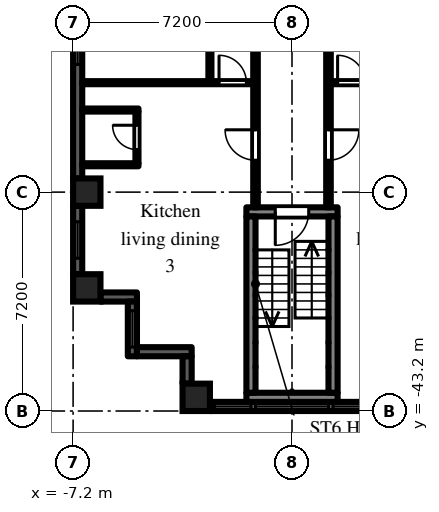
"""IFC4 building model, lengths in metres.
Left out: names, types, materials, properties, quantities, classifications, styles, units other than length and angle.
Written with IfcOpenShell. Run it as: python <this file> out.ifc"""

import sys

from ifc_helpers import new_model, si_unit, direction, frame, frame_2d, origin, origin_2d, place, context, subcontext, project, spatial, rectangle, extrude, element, fill, save


model = new_model("IFC4")
c1 = context("Model", 3, precision=1e-05, world=origin(), true_north=direction((0.0, 1.0)))
c2 = subcontext(c1, "Body", "Model", "MODEL_VIEW")
j1 = project(units=[si_unit("LENGTHUNIT", "METRE"), si_unit("PLANEANGLEUNIT", "RADIAN")], contexts=[c1])
p1 = place(None, origin())
s1 = spatial("IfcSite", under=j1, at=p1, CompositionType="ELEMENT")
p2 = place(p1, origin())
s2 = spatial("IfcBuilding", under=s1, at=p2, CompositionType="ELEMENT")
p3 = place(p2, frame((0.0, 0.0, 59.7)))
s3 = spatial("IfcBuildingStorey", under=s2, at=p3, CompositionType="ELEMENT", Elevation=59.7)
for number, where, z_axis, x_axis in (
    (1, (-6.75, -39.15, 0.0), (0.0, 0.0, 1.0), (1.0, 0.0, 0.0)),
    (2, (-6.75, -36.0, 0.0), (0.0, 0.0, 1.0), (1.0, 0.0, 0.0)),
    (3, (-3.15, -42.75, 0.0), (0.0, 0.0, 1.0), (1.0, 0.0, 0.0)),
):
    element("IfcColumn", number, at=place(p3, frame(where, z_axis=z_axis, x_axis=x_axis)), inside=s3, PredefinedType="COLUMN", context=c2, shape_type="SweptSolid", body=[
        extrude(rectangle(XDim=0.9, YDim=0.9, at=origin_2d()), origin(), (0.0, 0.0, 1.0), 3.0),
    ])
p4 = place(p3, frame((-7.05, -29.25, 0.0), z_axis=(0.0, 0.0, 1.0), x_axis=(0.0, -1.0, 0.0)))
e4 = element("IfcWall", 4, at=p4, inside=s3, PredefinedType="SOLIDWALL", context=c2, shape_type="SweptSolid", body=[
    extrude(rectangle(XDim=6.3, YDim=0.3, at=frame_2d((3.15, 0.0))), origin(), (0.0, 0.0, 1.0), 2.1),
])
p5 = place(p4, frame((0.15, 0.0, 0.2)))
e5 = element("IfcOpeningElement", 5, at=p5, cuts=e4, PredefinedType="OPENING", context=c2, shape_type="SweptSolid", body=[
    extrude(rectangle(XDim=2.4, YDim=1.85, at=frame_2d((1.2, 0.925))), frame((0.0, 0.16, 0.0), z_axis=(0.0, -1.0, 0.0), x_axis=(1.0, 0.0, 0.0)), (0.0, 0.0, 1.0), 0.32),
])
p6 = place(p3, frame((-7.05, -36.45, 0.0), z_axis=(0.0, 0.0, 1.0), x_axis=(0.0, -1.0, 0.0)))
e6 = element("IfcWall", 6, at=p6, inside=s3, PredefinedType="SOLIDWALL", context=c2, shape_type="SweptSolid", body=[
    extrude(rectangle(XDim=2.25, YDim=0.3, at=frame_2d((1.125, 0.0))), origin(), (0.0, 0.0, 1.0), 2.1),
])
p7 = place(p6, frame((0.525, 0.0, 0.2)))
e7 = element("IfcOpeningElement", 7, at=p7, cuts=e6, PredefinedType="OPENING", context=c2, shape_type="SweptSolid", body=[
    extrude(rectangle(XDim=1.2, YDim=1.85, at=frame_2d((0.6, 0.925))), frame((0.0, 0.16, 0.0), z_axis=(0.0, -1.0, 0.0), x_axis=(1.0, 0.0, 0.0)), (0.0, 0.0, 1.0), 0.32),
])
p8 = place(p3, frame((-6.3, -39.45, 0.0), z_axis=(0.0, 0.0, 1.0), x_axis=(1.0, 0.0, 0.0)))
e8 = element("IfcWall", 8, at=p8, inside=s3, PredefinedType="SOLIDWALL", context=c2, shape_type="SweptSolid", body=[
    extrude(rectangle(XDim=1.2, YDim=0.3, at=frame_2d((0.6, 0.0))), origin(), (0.0, 0.0, 1.0), 2.55),
])
p9 = place(p3, frame((-5.25, -39.6, 0.0), z_axis=(0.0, 0.0, 1.0), x_axis=(0.0, -1.0, 0.0)))
e9 = element("IfcWall", 9, at=p9, inside=s3, PredefinedType="SOLIDWALL", context=c2, shape_type="SweptSolid", body=[
    extrude(rectangle(XDim=1.8, YDim=0.3, at=frame_2d((0.9, 0.0))), origin(), (0.0, 0.0, 1.0), 2.55),
])
p10 = place(p9, frame((0.3, 0.0, 0.2)))
e10 = element("IfcOpeningElement", 10, at=p10, cuts=e9, PredefinedType="OPENING", context=c2, shape_type="SweptSolid", body=[
    extrude(rectangle(XDim=1.2, YDim=1.85, at=frame_2d((0.6, 0.925))), frame((0.0, 0.16, 0.0), z_axis=(0.0, -1.0, 0.0), x_axis=(1.0, 0.0, 0.0)), (0.0, 0.0, 1.0), 0.32),
])
p11 = place(p3, frame((-5.1, -41.25, 0.0), z_axis=(0.0, 0.0, 1.0), x_axis=(1.0, 0.0, 0.0)))
e11 = element("IfcWall", 11, at=p11, inside=s3, PredefinedType="SOLIDWALL", context=c2, shape_type="SweptSolid", body=[
    extrude(rectangle(XDim=1.8, YDim=0.3, at=frame_2d((0.9, 0.0))), origin(), (0.0, 0.0, 1.0), 2.55),
])
p12 = place(p3, frame((-3.45, -41.4, 0.0), z_axis=(0.0, 0.0, 1.0), x_axis=(0.0, -1.0, 0.0)))
e12 = element("IfcWall", 12, at=p12, inside=s3, PredefinedType="SOLIDWALL", context=c2, shape_type="SweptSolid", body=[
    extrude(rectangle(XDim=0.9, YDim=0.3, at=frame_2d((0.45, 0.0))), origin(), (0.0, 0.0, 1.0), 2.55),
])
p13 = place(p3, frame((-2.7, -43.05, 0.0), z_axis=(0.0, 0.0, 1.0), x_axis=(1.0, 0.0, 0.0)))
e13 = element("IfcWall", 13, at=p13, inside=s3, PredefinedType="SOLIDWALL", context=c2, shape_type="SweptSolid", body=[
    extrude(rectangle(XDim=5.4, YDim=0.3, at=frame_2d((2.7, 0.0))), origin(), (0.0, 0.0, 1.0), 2.1),
])
p14 = place(p13, frame((1.5, 0.0, 0.2)))
e14 = element("IfcOpeningElement", 14, at=p14, cuts=e13, PredefinedType="OPENING", context=c2, shape_type="SweptSolid", body=[
    extrude(rectangle(XDim=2.4, YDim=1.85, at=frame_2d((1.2, 0.925))), frame((0.0, 0.16, 0.0), z_axis=(0.0, -1.0, 0.0), x_axis=(1.0, 0.0, 0.0)), (0.0, 0.0, 1.0), 0.32),
])
p15 = place(p13, frame((0.15, 0.0, 0.2)))
e15 = element("IfcOpeningElement", 15, at=p15, cuts=e13, PredefinedType="OPENING", context=c2, shape_type="SweptSolid", body=[
    extrude(rectangle(XDim=1.2, YDim=1.85, at=frame_2d((0.6, 0.925))), frame((0.0, 0.16, 0.0), z_axis=(0.0, -1.0, 0.0), x_axis=(1.0, 0.0, 0.0)), (0.0, 0.0, 1.0), 0.32),
])
p16 = place(p13, frame((4.05, 0.0, 0.2)))
e16 = element("IfcOpeningElement", 16, at=p16, cuts=e13, PredefinedType="OPENING", context=c2, shape_type="SweptSolid", body=[
    extrude(rectangle(XDim=1.2, YDim=1.85, at=frame_2d((0.6, 0.925))), frame((0.0, 0.16, 0.0), z_axis=(0.0, -1.0, 0.0), x_axis=(1.0, 0.0, 0.0)), (0.0, 0.0, 1.0), 0.32),
])
p17 = place(p3, frame((-1.5, -36.65, 0.0), z_axis=(0.0, 0.0, 1.0), x_axis=(1.0, 0.0, 0.0)))
e17 = element("IfcWall", 17, at=p17, inside=s3, PredefinedType="SHEAR", context=c2, shape_type="SweptSolid", body=[
    extrude(rectangle(XDim=3.0, YDim=0.3, at=frame_2d((1.5, 0.0))), origin(), (0.0, 0.0, 1.0), 2.55),
])
p18 = place(p17, frame((0.95, 0.0, 0.0)))
e18 = element("IfcOpeningElement", 18, at=p18, cuts=e17, PredefinedType="OPENING", context=c2, shape_type="SweptSolid", body=[
    extrude(rectangle(XDim=1.1, YDim=2.1, at=frame_2d((0.55, 1.05))), frame((0.0, 0.16, 0.0), z_axis=(0.0, -1.0, 0.0), x_axis=(1.0, 0.0, 0.0)), (0.0, 0.0, 1.0), 0.32),
])
p19 = place(p3, frame((-1.5, -42.75, 0.0), z_axis=(0.0, 0.0, 1.0), x_axis=(1.0, 0.0, 0.0)))
e19 = element("IfcWall", 19, at=p19, inside=s3, PredefinedType="SHEAR", context=c2, shape_type="SweptSolid", body=[
    extrude(rectangle(XDim=3.0, YDim=0.3, at=frame_2d((1.5, 0.0))), origin(), (0.0, 0.0, 1.0), 2.55),
])
for number, where, z_axis, x_axis in (
    (20, (-1.35, -36.8, 0.0), (0.0, 0.0, 1.0), (0.0, -1.0, 0.0)),
    (21, (1.35, -36.8, 0.0), (0.0, 0.0, 1.0), (0.0, -1.0, 0.0)),
):
    element("IfcWall", number, at=place(p3, frame(where, z_axis=z_axis, x_axis=x_axis)), inside=s3, PredefinedType="SHEAR", context=c2, shape_type="SweptSolid", body=[
        extrude(rectangle(XDim=5.8, YDim=0.3, at=frame_2d((2.9, 0.0))), origin(), (0.0, 0.0, 1.0), 2.55),
    ])
for number, where, z_axis, x_axis in (
    (22, (-6.9, -35.1, 0.0), (0.0, 0.0, 1.0), (1.0, 0.0, 0.0)),
    (23, (-6.9, -33.3, 0.0), (0.0, 0.0, 1.0), (1.0, 0.0, 0.0)),
):
    element("IfcWall", number, at=place(p3, frame(where, z_axis=z_axis, x_axis=x_axis)), inside=s3, PredefinedType="PARTITIONING", context=c2, shape_type="SweptSolid", body=[
        extrude(rectangle(XDim=1.85, YDim=0.1, at=frame_2d((0.925, 0.0))), origin(), (0.0, 0.0, 1.0), 2.55),
    ])
p20 = place(p3, frame((-6.9, -32.4, 0.0), z_axis=(0.0, 0.0, 1.0), x_axis=(1.0, 0.0, 0.0)))
e24 = element("IfcWall", 24, at=p20, inside=s3, PredefinedType="PARTITIONING", context=c2, shape_type="SweptSolid", body=[
    extrude(rectangle(XDim=5.625, YDim=0.1, at=frame_2d((2.812, 0.0))), origin(), (0.0, 0.0, 1.0), 2.55),
])
p21 = place(p20, frame((4.5, 0.0, 0.0)))
e25 = element("IfcOpeningElement", 25, at=p21, cuts=e24, PredefinedType="OPENING", context=c2, shape_type="SweptSolid", body=[
    extrude(rectangle(XDim=0.9, YDim=2.1, at=frame_2d((0.45, 1.05))), frame((0.0, 0.06, 0.0), z_axis=(0.0, -1.0, 0.0), x_axis=(1.0, 0.0, 0.0)), (0.0, 0.0, 1.0), 0.12),
])
p22 = place(p3, frame((-5.1, -35.05, 0.0), z_axis=(0.0, 0.0, 1.0), x_axis=(0.0, 1.0, 0.0)))
e26 = element("IfcWall", 26, at=p22, inside=s3, PredefinedType="PARTITIONING", context=c2, shape_type="SweptSolid", body=[
    extrude(rectangle(XDim=1.7, YDim=0.1, at=frame_2d((0.85, 0.0))), origin(), (0.0, 0.0, 1.0), 2.55),
])
p23 = place(p22, frame((0.45, 0.0, 0.0)))
e27 = element("IfcOpeningElement", 27, at=p23, cuts=e26, PredefinedType="OPENING", context=c2, shape_type="SweptSolid", body=[
    extrude(rectangle(XDim=0.8, YDim=2.1, at=frame_2d((0.4, 1.05))), frame((0.0, 0.06, 0.0), z_axis=(0.0, -1.0, 0.0), x_axis=(1.0, 0.0, 0.0)), (0.0, 0.0, 1.0), 0.12),
])
p24 = place(p3, frame((-2.7, -32.35, 0.0), z_axis=(0.0, 0.0, 1.0), x_axis=(0.0, 1.0, 0.0)))
e28 = element("IfcWall", 28, at=p24, inside=s3, PredefinedType="PARTITIONING", context=c2, shape_type="SweptSolid", body=[
    extrude(rectangle(XDim=14.25, YDim=0.1, at=frame_2d((7.125, 0.0))), origin(), (0.0, 0.0, 1.0), 2.55),
])
p25 = place(p24, frame((3.28, 0.0, 0.0)))
e29 = element("IfcOpeningElement", 29, at=p25, cuts=e28, PredefinedType="OPENING", context=c2, shape_type="SweptSolid", body=[
    extrude(rectangle(XDim=0.9, YDim=2.1, at=frame_2d((0.45, 1.05))), frame((0.0, 0.06, 0.0), z_axis=(0.0, -1.0, 0.0), x_axis=(1.0, 0.0, 0.0)), (0.0, 0.0, 1.0), 0.12),
])
p26 = place(p24, frame((10.12, 0.0, 0.0)))
e30 = element("IfcOpeningElement", 30, at=p26, cuts=e28, PredefinedType="OPENING", context=c2, shape_type="SweptSolid", body=[
    extrude(rectangle(XDim=0.9, YDim=2.1, at=frame_2d((0.45, 1.05))), frame((0.0, 0.06, 0.0), z_axis=(0.0, -1.0, 0.0), x_axis=(1.0, 0.0, 0.0)), (0.0, 0.0, 1.0), 0.12),
])
p27 = place(p3, frame((-1.2, -36.5, 0.0), z_axis=(0.0, 0.0, 1.0), x_axis=(0.0, 1.0, 0.0)))
e31 = element("IfcWall", 31, at=p27, inside=s3, PredefinedType="PARTITIONING", context=c2, shape_type="SweptSolid", body=[
    extrude(rectangle(XDim=35.225, YDim=0.15, at=frame_2d((17.613, 0.0))), origin(), (0.0, 0.0, 1.0), 2.55),
])
p28 = place(p27, frame((31.85, 0.0, 0.0)))
e32 = element("IfcOpeningElement", 32, at=p28, cuts=e31, PredefinedType="OPENING", context=c2, shape_type="SweptSolid", body=[
    extrude(rectangle(XDim=0.9, YDim=2.1, at=frame_2d((0.45, 1.05))), frame((0.0, 0.085, 0.0), z_axis=(0.0, -1.0, 0.0), x_axis=(1.0, 0.0, 0.0)), (0.0, 0.0, 1.0), 0.17),
])
p29 = place(p27, frame((23.05, 0.0, 0.0)))
e33 = element("IfcOpeningElement", 33, at=p29, cuts=e31, PredefinedType="OPENING", context=c2, shape_type="SweptSolid", body=[
    extrude(rectangle(XDim=0.9, YDim=2.1, at=frame_2d((0.45, 1.05))), frame((0.0, 0.085, 0.0), z_axis=(0.0, -1.0, 0.0), x_axis=(1.0, 0.0, 0.0)), (0.0, 0.0, 1.0), 0.17),
])
p30 = place(p27, frame((26.65, 0.0, 0.0)))
e34 = element("IfcOpeningElement", 34, at=p30, cuts=e31, PredefinedType="OPENING", context=c2, shape_type="SweptSolid", body=[
    extrude(rectangle(XDim=0.9, YDim=2.1, at=frame_2d((0.45, 1.05))), frame((0.0, 0.085, 0.0), z_axis=(0.0, -1.0, 0.0), x_axis=(1.0, 0.0, 0.0)), (0.0, 0.0, 1.0), 0.17),
])
p31 = place(p27, frame((20.9, 0.0, 0.0)))
e35 = element("IfcOpeningElement", 35, at=p31, cuts=e31, PredefinedType="OPENING", context=c2, shape_type="SweptSolid", body=[
    extrude(rectangle(XDim=1.0, YDim=2.1, at=frame_2d((0.5, 1.05))), frame((0.0, 0.085, 0.0), z_axis=(0.0, -1.0, 0.0), x_axis=(1.0, 0.0, 0.0)), (0.0, 0.0, 1.0), 0.17),
])
p32 = place(p27, frame((1.55, 0.0, 0.0)))
e36 = element("IfcOpeningElement", 36, at=p32, cuts=e31, PredefinedType="OPENING", context=c2, shape_type="SweptSolid", body=[
    extrude(rectangle(XDim=1.0, YDim=2.1, at=frame_2d((0.5, 1.05))), frame((0.0, 0.085, 0.0), z_axis=(0.0, -1.0, 0.0), x_axis=(1.0, 0.0, 0.0)), (0.0, 0.0, 1.0), 0.17),
])
p33 = place(p3, frame((1.2, -36.5, 0.0), z_axis=(0.0, 0.0, 1.0), x_axis=(0.0, 1.0, 0.0)))
e37 = element("IfcWall", 37, at=p33, inside=s3, PredefinedType="PARTITIONING", context=c2, shape_type="SweptSolid", body=[
    extrude(rectangle(XDim=35.375, YDim=0.15, at=frame_2d((17.688, 0.0))), origin(), (0.0, 0.0, 1.0), 2.55),
])
p34 = place(p33, frame((33.65, 0.0, 0.0)))
e38 = element("IfcOpeningElement", 38, at=p34, cuts=e37, PredefinedType="OPENING", context=c2, shape_type="SweptSolid", body=[
    extrude(rectangle(XDim=0.9, YDim=2.1, at=frame_2d((0.45, 1.05))), frame((0.0, 0.085, 0.0), z_axis=(0.0, -1.0, 0.0), x_axis=(1.0, 0.0, 0.0)), (0.0, 0.0, 1.0), 0.17),
])
p35 = place(p33, frame((30.65, 0.0, 0.0)))
e39 = element("IfcOpeningElement", 39, at=p35, cuts=e37, PredefinedType="OPENING", context=c2, shape_type="SweptSolid", body=[
    extrude(rectangle(XDim=0.9, YDim=2.1, at=frame_2d((0.45, 1.05))), frame((0.0, 0.085, 0.0), z_axis=(0.0, -1.0, 0.0), x_axis=(1.0, 0.0, 0.0)), (0.0, 0.0, 1.0), 0.17),
])
p36 = place(p33, frame((27.45, 0.0, 0.0)))
e40 = element("IfcOpeningElement", 40, at=p36, cuts=e37, PredefinedType="OPENING", context=c2, shape_type="SweptSolid", body=[
    extrude(rectangle(XDim=0.9, YDim=2.1, at=frame_2d((0.45, 1.05))), frame((0.0, 0.085, 0.0), z_axis=(0.0, -1.0, 0.0), x_axis=(1.0, 0.0, 0.0)), (0.0, 0.0, 1.0), 0.17),
])
p37 = place(p33, frame((23.85, 0.0, 0.0)))
e41 = element("IfcOpeningElement", 41, at=p37, cuts=e37, PredefinedType="OPENING", context=c2, shape_type="SweptSolid", body=[
    extrude(rectangle(XDim=0.9, YDim=2.1, at=frame_2d((0.45, 1.05))), frame((0.0, 0.085, 0.0), z_axis=(0.0, -1.0, 0.0), x_axis=(1.0, 0.0, 0.0)), (0.0, 0.0, 1.0), 0.17),
])
p38 = place(p33, frame((20.75, 0.0, 0.0)))
e42 = element("IfcOpeningElement", 42, at=p38, cuts=e37, PredefinedType="OPENING", context=c2, shape_type="SweptSolid", body=[
    extrude(rectangle(XDim=0.9, YDim=2.1, at=frame_2d((0.45, 1.05))), frame((0.0, 0.085, 0.0), z_axis=(0.0, -1.0, 0.0), x_axis=(1.0, 0.0, 0.0)), (0.0, 0.0, 1.0), 0.17),
])
p39 = place(p33, frame((18.95, 0.0, 0.0)))
e43 = element("IfcOpeningElement", 43, at=p39, cuts=e37, PredefinedType="OPENING", context=c2, shape_type="SweptSolid", body=[
    extrude(rectangle(XDim=0.9, YDim=2.1, at=frame_2d((0.45, 1.05))), frame((0.0, 0.085, 0.0), z_axis=(0.0, -1.0, 0.0), x_axis=(1.0, 0.0, 0.0)), (0.0, 0.0, 1.0), 0.17),
])
p40 = place(p33, frame((1.55, 0.0, 0.0)))
e44 = element("IfcOpeningElement", 44, at=p40, cuts=e37, PredefinedType="OPENING", context=c2, shape_type="SweptSolid", body=[
    extrude(rectangle(XDim=1.0, YDim=2.1, at=frame_2d((0.5, 1.05))), frame((0.0, 0.085, 0.0), z_axis=(0.0, -1.0, 0.0), x_axis=(1.0, 0.0, 0.0)), (0.0, 0.0, 1.0), 0.17),
])
p41 = place(p3, frame((1.275, -32.4, 0.0), z_axis=(0.0, 0.0, 1.0), x_axis=(1.0, 0.0, 0.0)))
e45 = element("IfcWall", 45, at=p41, inside=s3, PredefinedType="PARTITIONING", context=c2, shape_type="SweptSolid", body=[
    extrude(rectangle(XDim=5.625, YDim=0.1, at=frame_2d((2.812, 0.0))), origin(), (0.0, 0.0, 1.0), 2.55),
])
p42 = place(p41, frame((0.225, 0.0, 0.0)))
e46 = element("IfcOpeningElement", 46, at=p42, cuts=e45, PredefinedType="OPENING", context=c2, shape_type="SweptSolid", body=[
    extrude(rectangle(XDim=0.9, YDim=2.1, at=frame_2d((0.45, 1.05))), frame((0.0, 0.06, 0.0), z_axis=(0.0, -1.0, 0.0), x_axis=(1.0, 0.0, 0.0)), (0.0, 0.0, 1.0), 0.12),
])
p43 = place(p5, origin())
e47 = element("IfcWindow", 47, at=p43, inside=s3, PartitioningType="SINGLE_PANEL", PredefinedType="WINDOW", context=c2, shape_type="SweptSolid", body=[
    extrude(rectangle(XDim=2.4, YDim=1.85, at=frame_2d((1.2, 0.925))), frame((0.0, 0.03, 0.0), z_axis=(0.0, -1.0, 0.0), x_axis=(1.0, 0.0, 0.0)), (0.0, 0.0, 1.0), 0.06),
])
fill(e5, e47)
p44 = place(p7, origin())
e48 = element("IfcWindow", 48, at=p44, inside=s3, PartitioningType="SINGLE_PANEL", PredefinedType="WINDOW", context=c2, shape_type="SweptSolid", body=[
    extrude(rectangle(XDim=1.2, YDim=1.85, at=frame_2d((0.6, 0.925))), frame((0.0, 0.03, 0.0), z_axis=(0.0, -1.0, 0.0), x_axis=(1.0, 0.0, 0.0)), (0.0, 0.0, 1.0), 0.06),
])
fill(e7, e48)
p45 = place(p10, origin())
e49 = element("IfcWindow", 49, at=p45, inside=s3, PartitioningType="SINGLE_PANEL", PredefinedType="WINDOW", context=c2, shape_type="SweptSolid", body=[
    extrude(rectangle(XDim=1.2, YDim=1.85, at=frame_2d((0.6, 0.925))), frame((0.0, 0.03, 0.0), z_axis=(0.0, -1.0, 0.0), x_axis=(1.0, 0.0, 0.0)), (0.0, 0.0, 1.0), 0.06),
])
fill(e10, e49)
p46 = place(p14, origin())
e50 = element("IfcWindow", 50, at=p46, inside=s3, PartitioningType="SINGLE_PANEL", PredefinedType="WINDOW", context=c2, shape_type="SweptSolid", body=[
    extrude(rectangle(XDim=2.4, YDim=1.85, at=frame_2d((1.2, 0.925))), frame((0.0, 0.03, 0.0), z_axis=(0.0, -1.0, 0.0), x_axis=(1.0, 0.0, 0.0)), (0.0, 0.0, 1.0), 0.06),
])
fill(e14, e50)
p47 = place(p15, origin())
e51 = element("IfcWindow", 51, at=p47, inside=s3, PartitioningType="SINGLE_PANEL", PredefinedType="WINDOW", context=c2, shape_type="SweptSolid", body=[
    extrude(rectangle(XDim=1.2, YDim=1.85, at=frame_2d((0.6, 0.925))), frame((0.0, 0.03, 0.0), z_axis=(0.0, -1.0, 0.0), x_axis=(1.0, 0.0, 0.0)), (0.0, 0.0, 1.0), 0.06),
])
fill(e15, e51)
p48 = place(p16, origin())
e52 = element("IfcWindow", 52, at=p48, inside=s3, PartitioningType="SINGLE_PANEL", PredefinedType="WINDOW", context=c2, shape_type="SweptSolid", body=[
    extrude(rectangle(XDim=1.2, YDim=1.85, at=frame_2d((0.6, 0.925))), frame((0.0, 0.03, 0.0), z_axis=(0.0, -1.0, 0.0), x_axis=(1.0, 0.0, 0.0)), (0.0, 0.0, 1.0), 0.06),
])
fill(e16, e52)
p49 = place(p18, frame((1.1, 0.0, 0.0), z_axis=(0.0, 0.0, 1.0), x_axis=(-1.0, 0.0, 0.0)))
e53 = element("IfcDoor", 53, at=p49, inside=s3, OperationType="SINGLE_SWING_RIGHT", PredefinedType="DOOR", context=c2, shape_type="SweptSolid", body=[
    extrude(rectangle(XDim=1.1, YDim=2.1, at=frame_2d((0.55, 1.05))), frame((0.0, 0.025, 0.0), z_axis=(0.0, -1.0, 0.0), x_axis=(1.0, 0.0, 0.0)), (0.0, 0.0, 1.0), 0.05),
])
fill(e18, e53)
p50 = place(p40, frame((1.0, 0.0, 0.0), z_axis=(0.0, 0.0, 1.0), x_axis=(-1.0, 0.0, 0.0)))
e54 = element("IfcDoor", 54, at=p50, inside=s3, OperationType="SINGLE_SWING_LEFT", PredefinedType="DOOR", context=c2, shape_type="SweptSolid", body=[
    extrude(rectangle(XDim=1.0, YDim=2.1, at=frame_2d((0.5, 1.05))), frame((0.0, 0.025, 0.0), z_axis=(0.0, -1.0, 0.0), x_axis=(1.0, 0.0, 0.0)), (0.0, 0.0, 1.0), 0.05),
])
fill(e44, e54)
p51 = place(p42, origin())
e55 = element("IfcDoor", 55, at=p51, inside=s3, OperationType="SINGLE_SWING_LEFT", PredefinedType="DOOR", context=c2, shape_type="SweptSolid", body=[
    extrude(rectangle(XDim=0.9, YDim=2.1, at=frame_2d((0.45, 1.05))), frame((0.0, 0.025, 0.0), z_axis=(0.0, -1.0, 0.0), x_axis=(1.0, 0.0, 0.0)), (0.0, 0.0, 1.0), 0.05),
])
fill(e46, e55)
p52 = place(p23, origin())
e56 = element("IfcDoor", 56, at=p52, inside=s3, OperationType="SINGLE_SWING_RIGHT", PredefinedType="DOOR", context=c2, shape_type="SweptSolid", body=[
    extrude(rectangle(XDim=0.8, YDim=2.1, at=frame_2d((0.4, 1.05))), frame((0.0, 0.025, 0.0), z_axis=(0.0, -1.0, 0.0), x_axis=(1.0, 0.0, 0.0)), (0.0, 0.0, 1.0), 0.05),
])
fill(e27, e56)
p53 = place(p32, origin())
e57 = element("IfcDoor", 57, at=p53, inside=s3, OperationType="SINGLE_SWING_RIGHT", PredefinedType="DOOR", context=c2, shape_type="SweptSolid", body=[
    extrude(rectangle(XDim=1.0, YDim=2.1, at=frame_2d((0.5, 1.05))), frame((0.0, 0.025, 0.0), z_axis=(0.0, -1.0, 0.0), x_axis=(1.0, 0.0, 0.0)), (0.0, 0.0, 1.0), 0.05),
])
fill(e36, e57)
p54 = place(p21, origin())
e58 = element("IfcDoor", 58, at=p54, inside=s3, OperationType="SINGLE_SWING_LEFT", PredefinedType="DOOR", context=c2, shape_type="SweptSolid", body=[
    extrude(rectangle(XDim=0.9, YDim=2.1, at=frame_2d((0.45, 1.05))), frame((0.0, 0.025, 0.0), z_axis=(0.0, -1.0, 0.0), x_axis=(1.0, 0.0, 0.0)), (0.0, 0.0, 1.0), 0.05),
])
fill(e25, e58)
save(model, sys.argv[1])
